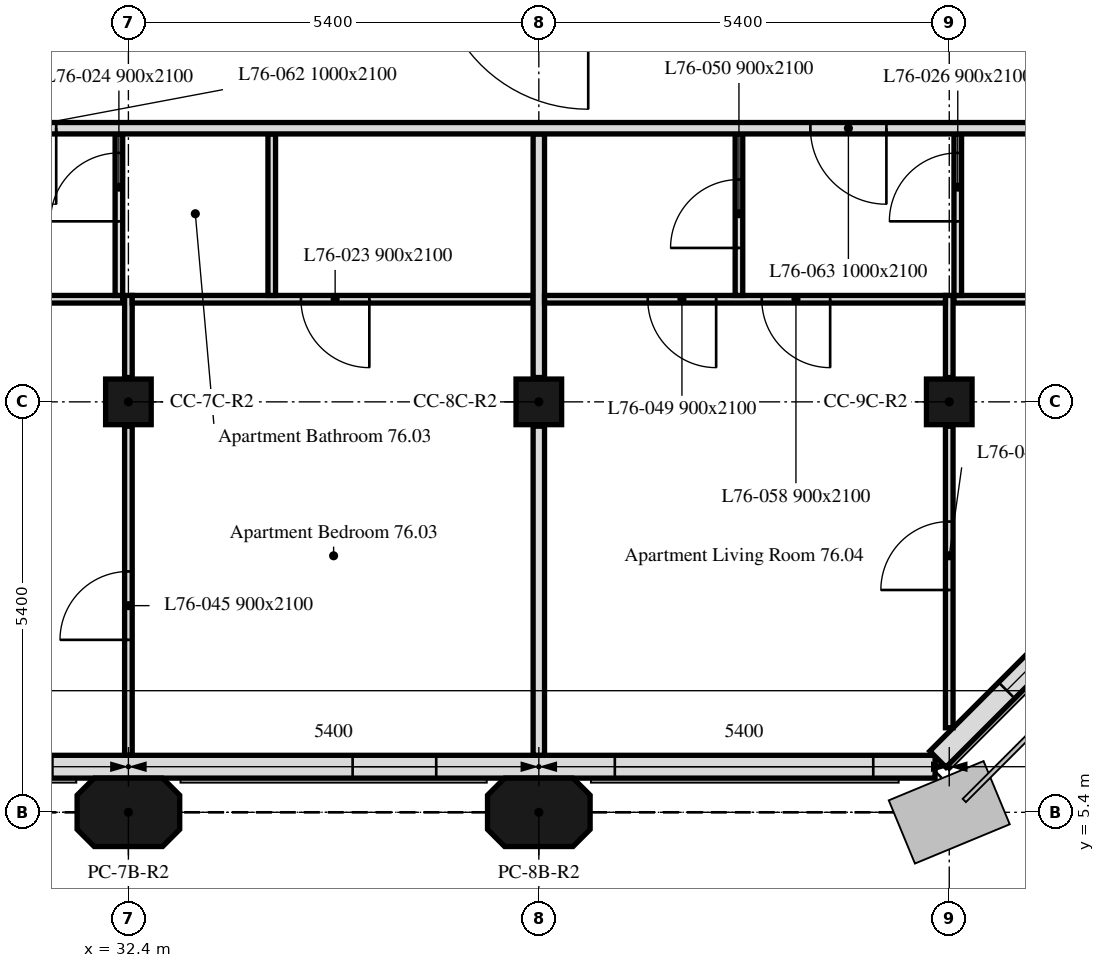
"""IFC4 building model, lengths in metres.
Left out: names, types, materials, properties, quantities, classifications, styles, units other than length and angle.
Written with IfcOpenShell. Run it as: python <this file> out.ifc"""

import sys

from ifc_helpers import new_model, si_unit, direction, frame, frame_2d, origin, origin_2d, place, context, subcontext, project, spatial, polyline, rectangle, outline, extrude, element, fill, save


model = new_model("IFC4")
c1 = context("Model", 3, precision=1e-05, world=origin(), true_north=direction((0.0, 1.0)))
c2 = subcontext(c1, "Body", "Model", "MODEL_VIEW")
j1 = project(units=[si_unit("LENGTHUNIT", "METRE"), si_unit("PLANEANGLEUNIT", "RADIAN")], contexts=[c1])
p1 = place(None, origin())
s1 = spatial("IfcSite", under=j1, at=p1, CompositionType="ELEMENT")
p2 = place(p1, origin())
s2 = spatial("IfcBuilding", under=s1, at=p2, CompositionType="ELEMENT")
p3 = place(p2, frame((0.0, 0.0, 304.9)))
s3 = spatial("IfcBuildingStorey", under=s2, at=p3, CompositionType="ELEMENT", Elevation=304.9)
for number, where, z_axis, x_axis in (
    (1, (32.4, 5.4, 0.0), (0.0, 0.0, 1.0), (1.0, 0.0, 0.0)),
    (2, (37.8, 5.4, 0.0), (0.0, 0.0, 1.0), (1.0, 0.0, 0.0)),
):
    element("IfcColumn", number, at=place(p3, frame(where, z_axis=z_axis, x_axis=x_axis)), inside=s3, PredefinedType="COLUMN", context=c2, shape_type="SweptSolid", body=[
        extrude(outline(polyline([(-0.45, -0.45), (0.45, -0.45), (0.675, -0.225), (0.675, 0.225), (0.45, 0.45), (-0.45, 0.45), (-0.675, 0.225), (-0.675, -0.225), (-0.45, -0.45)])), origin(), (0.0, 0.0, 1.0), 2.8),
    ])
for number, where, z_axis, x_axis in (
    (3, (32.4, 10.8, 0.0), (0.0, 0.0, 1.0), (1.0, 0.0, 0.0)),
    (4, (37.8, 10.8, 0.0), (0.0, 0.0, 1.0), (1.0, 0.0, 0.0)),
    (5, (43.2, 10.8, 0.0), (0.0, 0.0, 1.0), (1.0, 0.0, 0.0)),
):
    element("IfcColumn", number, at=place(p3, frame(where, z_axis=z_axis, x_axis=x_axis)), inside=s3, PredefinedType="COLUMN", context=c2, shape_type="SweptSolid", body=[
        extrude(rectangle(XDim=0.6, YDim=0.6, at=origin_2d()), origin(), (0.0, 0.0, 1.0), 2.8),
    ])
p4 = place(p3, frame((10.986, 6.0, 0.0), z_axis=(0.0, 0.0, 1.0), x_axis=(1.0, 0.0, 0.0)))
e6 = element("IfcWall", 6, at=p4, inside=s3, PredefinedType="SOLIDWALL", context=c2, shape_type="SweptSolid", body=[
    extrude(rectangle(XDim=32.027, YDim=0.3, at=frame_2d((16.014, 0.0))), origin(), (0.0, 0.0, 1.0), 2.8),
])
p5 = place(p4, frame((2.764, 0.0, 0.9)))
e7 = element("IfcOpeningElement", 7, at=p5, cuts=e6, PredefinedType="OPENING", context=c2, shape_type="SweptSolid", body=[
    extrude(rectangle(XDim=1.1, YDim=1.7, at=frame_2d((0.55, 0.85))), frame((0.0, 0.16, 0.0), z_axis=(0.0, -1.0, 0.0), x_axis=(1.0, 0.0, 0.0)), (0.0, 0.0, 1.0), 0.32),
])
p6 = place(p4, frame((6.214, 0.0, 0.9)))
e8 = element("IfcOpeningElement", 8, at=p6, cuts=e6, PredefinedType="OPENING", context=c2, shape_type="SweptSolid", body=[
    extrude(rectangle(XDim=3.4, YDim=1.7, at=frame_2d((1.7, 0.85))), frame((0.0, 0.16, 0.0), z_axis=(0.0, -1.0, 0.0), x_axis=(1.0, 0.0, 0.0)), (0.0, 0.0, 1.0), 0.32),
])
p7 = place(p4, frame((13.564, 0.0, 0.9)))
e9 = element("IfcOpeningElement", 9, at=p7, cuts=e6, PredefinedType="OPENING", context=c2, shape_type="SweptSolid", body=[
    extrude(rectangle(XDim=1.1, YDim=1.7, at=frame_2d((0.55, 0.85))), frame((0.0, 0.16, 0.0), z_axis=(0.0, -1.0, 0.0), x_axis=(1.0, 0.0, 0.0)), (0.0, 0.0, 1.0), 0.32),
])
p8 = place(p4, frame((17.014, 0.0, 0.9)))
e10 = element("IfcOpeningElement", 10, at=p8, cuts=e6, PredefinedType="OPENING", context=c2, shape_type="SweptSolid", body=[
    extrude(rectangle(XDim=3.4, YDim=1.7, at=frame_2d((1.7, 0.85))), frame((0.0, 0.16, 0.0), z_axis=(0.0, -1.0, 0.0), x_axis=(1.0, 0.0, 0.0)), (0.0, 0.0, 1.0), 0.32),
])
p9 = place(p4, frame((24.364, 0.0, 0.9)))
e11 = element("IfcOpeningElement", 11, at=p9, cuts=e6, PredefinedType="OPENING", context=c2, shape_type="SweptSolid", body=[
    extrude(rectangle(XDim=1.1, YDim=1.7, at=frame_2d((0.55, 0.85))), frame((0.0, 0.16, 0.0), z_axis=(0.0, -1.0, 0.0), x_axis=(1.0, 0.0, 0.0)), (0.0, 0.0, 1.0), 0.32),
])
p10 = place(p4, frame((27.814, 0.0, 0.9)))
e12 = element("IfcOpeningElement", 12, at=p10, cuts=e6, PredefinedType="OPENING", context=c2, shape_type="SweptSolid", body=[
    extrude(rectangle(XDim=3.4, YDim=1.7, at=frame_2d((1.7, 0.85))), frame((0.0, 0.16, 0.0), z_axis=(0.0, -1.0, 0.0), x_axis=(1.0, 0.0, 0.0)), (0.0, 0.0, 1.0), 0.32),
])
p11 = place(p3, frame((43.051, 6.099, 0.0), z_axis=(0.0, 0.0, 1.0), x_axis=(0.707106781187, 0.707106781187, 0.0)))
e13 = element("IfcWall", 13, at=p11, inside=s3, PredefinedType="SOLIDWALL", context=c2, shape_type="SweptSolid", body=[
    extrude(rectangle(XDim=6.86, YDim=0.3, at=frame_2d((3.43, 0.0))), origin(), (0.0, 0.0, 1.0), 2.8),
])
p12 = place(p11, frame((1.28, 0.0, 0.9)))
e14 = element("IfcOpeningElement", 14, at=p12, cuts=e13, PredefinedType="OPENING", context=c2, shape_type="SweptSolid", body=[
    extrude(rectangle(XDim=1.1, YDim=1.7, at=frame_2d((0.55, 0.85))), frame((0.0, 0.16, 0.0), z_axis=(0.0, -1.0, 0.0), x_axis=(1.0, 0.0, 0.0)), (0.0, 0.0, 1.0), 0.32),
])
p13 = place(p11, frame((4.48, 0.0, 0.9)))
e15 = element("IfcOpeningElement", 15, at=p13, cuts=e13, PredefinedType="OPENING", context=c2, shape_type="SweptSolid", body=[
    extrude(rectangle(XDim=1.1, YDim=1.7, at=frame_2d((0.55, 0.85))), frame((0.0, 0.16, 0.0), z_axis=(0.0, -1.0, 0.0), x_axis=(1.0, 0.0, 0.0)), (0.0, 0.0, 1.0), 0.32),
])
p14 = place(p3, frame((32.4, 6.151, 0.0), z_axis=(0.0, 0.0, 1.0), x_axis=(0.0, 1.0, 0.0)))
e16 = element("IfcWall", 16, at=p14, inside=s3, PredefinedType="PARTITIONING", context=c2, shape_type="SweptSolid", body=[
    extrude(rectangle(XDim=4.329, YDim=0.1, at=frame_2d((2.165, 0.0))), origin(), (0.0, 0.0, 1.0), 2.8),
])
p15 = place(p14, frame((1.518, 0.0, 0.0)))
e17 = element("IfcOpeningElement", 17, at=p15, cuts=e16, PredefinedType="OPENING", context=c2, shape_type="SweptSolid", body=[
    extrude(rectangle(XDim=0.9, YDim=2.1, at=frame_2d((0.45, 1.05))), frame((0.0, 0.05, 0.0), z_axis=(0.0, -1.0, 0.0), x_axis=(1.0, 0.0, 0.0)), (0.0, 0.0, 1.0), 0.1),
])
p16 = place(p3, frame((32.4, 11.12, 0.0), z_axis=(0.0, 0.0, 1.0), x_axis=(0.0, 1.0, 0.0)))
e18 = element("IfcWall", 18, at=p16, inside=s3, PredefinedType="PARTITIONING", context=c2, shape_type="SweptSolid", body=[
    extrude(rectangle(XDim=1.08, YDim=0.1, at=frame_2d((0.54, 0.0))), origin(), (0.0, 0.0, 1.0), 2.8),
])
p17 = place(p3, frame((32.325, 12.15, 0.0), z_axis=(0.0, 0.0, 1.0), x_axis=(-1.0, 0.0, 0.0)))
e19 = element("IfcWall", 19, at=p17, inside=s3, PredefinedType="PARTITIONING", context=c2, shape_type="SweptSolid", body=[
    extrude(rectangle(XDim=5.25, YDim=0.1, at=frame_2d((2.625, 0.0))), origin(), (0.0, 0.0, 1.0), 2.8),
])
p18 = place(p17, frame((3.0, 0.0, 0.0)))
e20 = element("IfcOpeningElement", 20, at=p18, cuts=e19, PredefinedType="OPENING", context=c2, shape_type="SweptSolid", body=[
    extrude(rectangle(XDim=0.9, YDim=2.1, at=frame_2d((0.45, 1.05))), frame((0.0, 0.05, 0.0), z_axis=(0.0, -1.0, 0.0), x_axis=(1.0, 0.0, 0.0)), (0.0, 0.0, 1.0), 0.1),
])
p19 = place(p17, frame((1.5, 0.0, 0.0)))
e21 = element("IfcOpeningElement", 21, at=p19, cuts=e19, PredefinedType="OPENING", context=c2, shape_type="SweptSolid", body=[
    extrude(rectangle(XDim=0.9, YDim=2.1, at=frame_2d((0.45, 1.05))), frame((0.0, 0.05, 0.0), z_axis=(0.0, -1.0, 0.0), x_axis=(1.0, 0.0, 0.0)), (0.0, 0.0, 1.0), 0.1),
])
p20 = place(p3, frame((37.8, 6.151, 0.0), z_axis=(0.0, 0.0, 1.0), x_axis=(0.0, 1.0, 0.0)))
e22 = element("IfcWall", 22, at=p20, inside=s3, PredefinedType="PARTITIONING", context=c2, shape_type="SweptSolid", body=[
    extrude(rectangle(XDim=4.329, YDim=0.15, at=frame_2d((2.165, 0.0))), origin(), (0.0, 0.0, 1.0), 2.8),
])
p21 = place(p3, frame((37.725, 12.15, 0.0), z_axis=(0.0, 0.0, 1.0), x_axis=(-1.0, 0.0, 0.0)))
e23 = element("IfcWall", 23, at=p21, inside=s3, PredefinedType="PARTITIONING", context=c2, shape_type="SweptSolid", body=[
    extrude(rectangle(XDim=5.275, YDim=0.1, at=frame_2d((2.638, 0.0))), origin(), (0.0, 0.0, 1.0), 2.8),
])
p22 = place(p21, frame((2.155, 0.0, 0.0)))
e24 = element("IfcOpeningElement", 24, at=p22, cuts=e23, PredefinedType="OPENING", context=c2, shape_type="SweptSolid", body=[
    extrude(rectangle(XDim=0.9, YDim=2.1, at=frame_2d((0.45, 1.05))), frame((0.0, 0.05, 0.0), z_axis=(0.0, -1.0, 0.0), x_axis=(1.0, 0.0, 0.0)), (0.0, 0.0, 1.0), 0.1),
])
p23 = place(p3, frame((32.275, 12.2, 0.0), z_axis=(0.0, 0.0, 1.0), x_axis=(0.0, 1.0, 0.0)))
e25 = element("IfcWall", 25, at=p23, inside=s3, PredefinedType="PARTITIONING", context=c2, shape_type="SweptSolid", body=[
    extrude(rectangle(XDim=2.125, YDim=0.1, at=frame_2d((1.062, 0.0))), origin(), (0.0, 0.0, 1.0), 2.8),
])
p24 = place(p23, frame((0.975, 0.0, 0.0)))
e26 = element("IfcOpeningElement", 26, at=p24, cuts=e25, PredefinedType="OPENING", context=c2, shape_type="SweptSolid", body=[
    extrude(rectangle(XDim=0.9, YDim=2.1, at=frame_2d((0.45, 1.05))), frame((0.0, 0.05, 0.0), z_axis=(0.0, -1.0, 0.0), x_axis=(1.0, 0.0, 0.0)), (0.0, 0.0, 1.0), 0.1),
])
p25 = place(p3, frame((34.286, 12.2, 0.0), z_axis=(0.0, 0.0, 1.0), x_axis=(0.0, 1.0, 0.0)))
e27 = element("IfcWall", 27, at=p25, inside=s3, PredefinedType="PARTITIONING", context=c2, shape_type="SweptSolid", body=[
    extrude(rectangle(XDim=2.125, YDim=0.1, at=frame_2d((1.062, 0.0))), origin(), (0.0, 0.0, 1.0), 2.8),
])
p26 = place(p3, frame((37.8, 11.12, 0.0), z_axis=(0.0, 0.0, 1.0), x_axis=(0.0, 1.0, 0.0)))
e28 = element("IfcWall", 28, at=p26, inside=s3, PredefinedType="PARTITIONING", context=c2, shape_type="SweptSolid", body=[
    extrude(rectangle(XDim=3.205, YDim=0.15, at=frame_2d((1.603, 0.0))), origin(), (0.0, 0.0, 1.0), 2.8),
])
p27 = place(p3, frame((43.2, 6.512, 0.0), z_axis=(0.0, 0.0, 1.0), x_axis=(0.0, 1.0, 0.0)))
e29 = element("IfcWall", 29, at=p27, inside=s3, PredefinedType="PARTITIONING", context=c2, shape_type="SweptSolid", body=[
    extrude(rectangle(XDim=3.968, YDim=0.1, at=frame_2d((1.984, 0.0))), origin(), (0.0, 0.0, 1.0), 2.8),
])
p28 = place(p27, frame((1.813, 0.0, 0.0)))
e30 = element("IfcOpeningElement", 30, at=p28, cuts=e29, PredefinedType="OPENING", context=c2, shape_type="SweptSolid", body=[
    extrude(rectangle(XDim=0.9, YDim=2.1, at=frame_2d((0.45, 1.05))), frame((0.0, 0.05, 0.0), z_axis=(0.0, -1.0, 0.0), x_axis=(1.0, 0.0, 0.0)), (0.0, 0.0, 1.0), 0.1),
])
p29 = place(p3, frame((43.2, 11.12, 0.0), z_axis=(0.0, 0.0, 1.0), x_axis=(0.0, 1.0, 0.0)))
e31 = element("IfcWall", 31, at=p29, inside=s3, PredefinedType="PARTITIONING", context=c2, shape_type="SweptSolid", body=[
    extrude(rectangle(XDim=1.08, YDim=0.1, at=frame_2d((0.54, 0.0))), origin(), (0.0, 0.0, 1.0), 2.8),
])
p30 = place(p3, frame((43.15, 12.15, 0.0), z_axis=(0.0, 0.0, 1.0), x_axis=(-1.0, 0.0, 0.0)))
e32 = element("IfcWall", 32, at=p30, inside=s3, PredefinedType="PARTITIONING", context=c2, shape_type="SweptSolid", body=[
    extrude(rectangle(XDim=5.275, YDim=0.1, at=frame_2d((2.637, 0.0))), origin(), (0.0, 0.0, 1.0), 2.8),
])
p31 = place(p30, frame((3.017, 0.0, 0.0)))
e33 = element("IfcOpeningElement", 33, at=p31, cuts=e32, PredefinedType="OPENING", context=c2, shape_type="SweptSolid", body=[
    extrude(rectangle(XDim=0.9, YDim=2.1, at=frame_2d((0.45, 1.05))), frame((0.0, 0.05, 0.0), z_axis=(0.0, -1.0, 0.0), x_axis=(1.0, 0.0, 0.0)), (0.0, 0.0, 1.0), 0.1),
])
p32 = place(p30, frame((1.517, 0.0, 0.0)))
e34 = element("IfcOpeningElement", 34, at=p32, cuts=e32, PredefinedType="OPENING", context=c2, shape_type="SweptSolid", body=[
    extrude(rectangle(XDim=0.9, YDim=2.1, at=frame_2d((0.45, 1.05))), frame((0.0, 0.05, 0.0), z_axis=(0.0, -1.0, 0.0), x_axis=(1.0, 0.0, 0.0)), (0.0, 0.0, 1.0), 0.1),
])
p33 = place(p3, frame((47.849, 12.15, 0.0), z_axis=(0.0, 0.0, 1.0), x_axis=(-1.0, 0.0, 0.0)))
e35 = element("IfcWall", 35, at=p33, inside=s3, PredefinedType="PARTITIONING", context=c2, shape_type="SweptSolid", body=[
    extrude(rectangle(XDim=4.587, YDim=0.1, at=frame_2d((2.293, 0.0))), origin(), (0.0, 0.0, 1.0), 2.8),
])
p34 = place(p33, frame((0.418, 0.0, 0.0)))
e36 = element("IfcOpeningElement", 36, at=p34, cuts=e35, PredefinedType="OPENING", context=c2, shape_type="SweptSolid", body=[
    extrude(rectangle(XDim=0.9, YDim=2.1, at=frame_2d((0.45, 1.05))), frame((0.0, 0.05, 0.0), z_axis=(0.0, -1.0, 0.0), x_axis=(1.0, 0.0, 0.0)), (0.0, 0.0, 1.0), 0.1),
])
p35 = place(p3, frame((40.433, 12.2, 0.0), z_axis=(0.0, 0.0, 1.0), x_axis=(0.0, 1.0, 0.0)))
e37 = element("IfcWall", 37, at=p35, inside=s3, PredefinedType="PARTITIONING", context=c2, shape_type="SweptSolid", body=[
    extrude(rectangle(XDim=2.125, YDim=0.1, at=frame_2d((1.062, 0.0))), origin(), (0.0, 0.0, 1.0), 2.8),
])
p36 = place(p35, frame((0.625, 0.0, 0.0)))
e38 = element("IfcOpeningElement", 38, at=p36, cuts=e37, PredefinedType="OPENING", context=c2, shape_type="SweptSolid", body=[
    extrude(rectangle(XDim=0.9, YDim=2.1, at=frame_2d((0.45, 1.05))), frame((0.0, 0.05, 0.0), z_axis=(0.0, -1.0, 0.0), x_axis=(1.0, 0.0, 0.0)), (0.0, 0.0, 1.0), 0.1),
])
p37 = place(p3, frame((43.312, 12.2, 0.0), z_axis=(0.0, 0.0, 1.0), x_axis=(0.0, 1.0, 0.0)))
e39 = element("IfcWall", 39, at=p37, inside=s3, PredefinedType="PARTITIONING", context=c2, shape_type="SweptSolid", body=[
    extrude(rectangle(XDim=2.125, YDim=0.1, at=frame_2d((1.062, 0.0))), origin(), (0.0, 0.0, 1.0), 2.8),
])
p38 = place(p37, frame((0.975, 0.0, 0.0)))
e40 = element("IfcOpeningElement", 40, at=p38, cuts=e39, PredefinedType="OPENING", context=c2, shape_type="SweptSolid", body=[
    extrude(rectangle(XDim=0.9, YDim=2.1, at=frame_2d((0.45, 1.05))), frame((0.0, 0.05, 0.0), z_axis=(0.0, -1.0, 0.0), x_axis=(1.0, 0.0, 0.0)), (0.0, 0.0, 1.0), 0.1),
])
p39 = place(p3, frame((47.849, 14.4, 0.0), z_axis=(0.0, 0.0, 1.0), x_axis=(-1.0, 0.0, 0.0)))
e41 = element("IfcWall", 41, at=p39, inside=s3, PredefinedType="PARTITIONING", context=c2, shape_type="SweptSolid", body=[
    extrude(rectangle(XDim=41.698, YDim=0.15, at=frame_2d((20.849, 0.0))), origin(), (0.0, 0.0, 1.0), 2.8),
])
p40 = place(p39, frame((38.179, 0.0, 0.0)))
e42 = element("IfcOpeningElement", 42, at=p40, cuts=e41, PredefinedType="OPENING", context=c2, shape_type="SweptSolid", body=[
    extrude(rectangle(XDim=1.0, YDim=2.1, at=frame_2d((0.5, 1.05))), frame((0.0, 0.075, 0.0), z_axis=(0.0, -1.0, 0.0), x_axis=(1.0, 0.0, 0.0)), (0.0, 0.0, 1.0), 0.15),
])
p41 = place(p39, frame((27.977, 0.0, 0.0)))
e43 = element("IfcOpeningElement", 43, at=p41, cuts=e41, PredefinedType="OPENING", context=c2, shape_type="SweptSolid", body=[
    extrude(rectangle(XDim=1.0, YDim=2.1, at=frame_2d((0.5, 1.05))), frame((0.0, 0.075, 0.0), z_axis=(0.0, -1.0, 0.0), x_axis=(1.0, 0.0, 0.0)), (0.0, 0.0, 1.0), 0.15),
])
p42 = place(p39, frame((16.399, 0.0, 0.0)))
e44 = element("IfcOpeningElement", 44, at=p42, cuts=e41, PredefinedType="OPENING", context=c2, shape_type="SweptSolid", body=[
    extrude(rectangle(XDim=1.0, YDim=2.1, at=frame_2d((0.5, 1.05))), frame((0.0, 0.075, 0.0), z_axis=(0.0, -1.0, 0.0), x_axis=(1.0, 0.0, 0.0)), (0.0, 0.0, 1.0), 0.15),
])
p43 = place(p39, frame((5.476, 0.0, 0.0)))
e45 = element("IfcOpeningElement", 45, at=p43, cuts=e41, PredefinedType="OPENING", context=c2, shape_type="SweptSolid", body=[
    extrude(rectangle(XDim=1.0, YDim=2.1, at=frame_2d((0.5, 1.05))), frame((0.0, 0.075, 0.0), z_axis=(0.0, -1.0, 0.0), x_axis=(1.0, 0.0, 0.0)), (0.0, 0.0, 1.0), 0.15),
])
p44 = place(p9, origin())
e46 = element("IfcWindow", 46, at=p44, inside=s3, PartitioningType="SINGLE_PANEL", PredefinedType="WINDOW", context=c2, shape_type="SweptSolid", body=[
    extrude(rectangle(XDim=1.1, YDim=1.7, at=frame_2d((0.55, 0.85))), frame((0.0, 0.03, 0.0), z_axis=(0.0, -1.0, 0.0), x_axis=(1.0, 0.0, 0.0)), (0.0, 0.0, 1.0), 0.06),
])
fill(e11, e46)
p45 = place(p10, origin())
e47 = element("IfcWindow", 47, at=p45, inside=s3, PartitioningType="SINGLE_PANEL", PredefinedType="WINDOW", context=c2, shape_type="SweptSolid", body=[
    extrude(rectangle(XDim=3.4, YDim=1.7, at=frame_2d((1.7, 0.85))), frame((0.0, 0.03, 0.0), z_axis=(0.0, -1.0, 0.0), x_axis=(1.0, 0.0, 0.0)), (0.0, 0.0, 1.0), 0.06),
])
fill(e12, e47)
p46 = place(p12, origin())
e48 = element("IfcWindow", 48, at=p46, inside=s3, PartitioningType="SINGLE_PANEL", PredefinedType="WINDOW", context=c2, shape_type="SweptSolid", body=[
    extrude(rectangle(XDim=1.1, YDim=1.7, at=frame_2d((0.55, 0.85))), frame((0.0, 0.03, 0.0), z_axis=(0.0, -1.0, 0.0), x_axis=(1.0, 0.0, 0.0)), (0.0, 0.0, 1.0), 0.06),
])
fill(e14, e48)
p47 = place(p22, origin())
e49 = element("IfcDoor", 49, at=p47, inside=s3, OperationType="SINGLE_SWING_LEFT", PredefinedType="DOOR", context=c2, shape_type="SweptSolid", body=[
    extrude(rectangle(XDim=0.9, YDim=2.1, at=frame_2d((0.45, 1.05))), frame((0.0, 0.025, 0.0), z_axis=(0.0, -1.0, 0.0), x_axis=(1.0, 0.0, 0.0)), (0.0, 0.0, 1.0), 0.05),
])
fill(e24, e49)
p48 = place(p24, origin())
e50 = element("IfcDoor", 50, at=p48, inside=s3, OperationType="SINGLE_SWING_RIGHT", PredefinedType="DOOR", context=c2, shape_type="SweptSolid", body=[
    extrude(rectangle(XDim=0.9, YDim=2.1, at=frame_2d((0.45, 1.05))), frame((0.0, 0.025, 0.0), z_axis=(0.0, -1.0, 0.0), x_axis=(1.0, 0.0, 0.0)), (0.0, 0.0, 1.0), 0.05),
])
fill(e26, e50)
p49 = place(p38, origin())
e51 = element("IfcDoor", 51, at=p49, inside=s3, OperationType="SINGLE_SWING_LEFT", PredefinedType="DOOR", context=c2, shape_type="SweptSolid", body=[
    extrude(rectangle(XDim=0.9, YDim=2.1, at=frame_2d((0.45, 1.05))), frame((0.0, 0.025, 0.0), z_axis=(0.0, -1.0, 0.0), x_axis=(1.0, 0.0, 0.0)), (0.0, 0.0, 1.0), 0.05),
])
fill(e40, e51)
p50 = place(p15, origin())
e52 = element("IfcDoor", 52, at=p50, inside=s3, OperationType="SINGLE_SWING_LEFT", PredefinedType="DOOR", context=c2, shape_type="SweptSolid", body=[
    extrude(rectangle(XDim=0.9, YDim=2.1, at=frame_2d((0.45, 1.05))), frame((0.0, 0.025, 0.0), z_axis=(0.0, -1.0, 0.0), x_axis=(1.0, 0.0, 0.0)), (0.0, 0.0, 1.0), 0.05),
])
fill(e17, e52)
p51 = place(p28, origin())
e53 = element("IfcDoor", 53, at=p51, inside=s3, OperationType="SINGLE_SWING_LEFT", PredefinedType="DOOR", context=c2, shape_type="SweptSolid", body=[
    extrude(rectangle(XDim=0.9, YDim=2.1, at=frame_2d((0.45, 1.05))), frame((0.0, 0.025, 0.0), z_axis=(0.0, -1.0, 0.0), x_axis=(1.0, 0.0, 0.0)), (0.0, 0.0, 1.0), 0.05),
])
fill(e30, e53)
p52 = place(p31, origin())
e54 = element("IfcDoor", 54, at=p52, inside=s3, OperationType="SINGLE_SWING_LEFT", PredefinedType="DOOR", context=c2, shape_type="SweptSolid", body=[
    extrude(rectangle(XDim=0.9, YDim=2.1, at=frame_2d((0.45, 1.05))), frame((0.0, 0.025, 0.0), z_axis=(0.0, -1.0, 0.0), x_axis=(1.0, 0.0, 0.0)), (0.0, 0.0, 1.0), 0.05),
])
fill(e33, e54)
p53 = place(p36, origin())
e55 = element("IfcDoor", 55, at=p53, inside=s3, OperationType="SINGLE_SWING_LEFT", PredefinedType="DOOR", context=c2, shape_type="SweptSolid", body=[
    extrude(rectangle(XDim=0.9, YDim=2.1, at=frame_2d((0.45, 1.05))), frame((0.0, 0.025, 0.0), z_axis=(0.0, -1.0, 0.0), x_axis=(1.0, 0.0, 0.0)), (0.0, 0.0, 1.0), 0.05),
])
fill(e38, e55)
p54 = place(p32, origin())
e56 = element("IfcDoor", 56, at=p54, inside=s3, OperationType="SINGLE_SWING_RIGHT", PredefinedType="DOOR", context=c2, shape_type="SweptSolid", body=[
    extrude(rectangle(XDim=0.9, YDim=2.1, at=frame_2d((0.45, 1.05))), frame((0.0, 0.025, 0.0), z_axis=(0.0, -1.0, 0.0), x_axis=(1.0, 0.0, 0.0)), (0.0, 0.0, 1.0), 0.05),
])
fill(e34, e56)
p55 = place(p42, origin())
e57 = element("IfcDoor", 57, at=p55, inside=s3, OperationType="SINGLE_SWING_LEFT", PredefinedType="DOOR", context=c2, shape_type="SweptSolid", body=[
    extrude(rectangle(XDim=1.0, YDim=2.1, at=frame_2d((0.5, 1.05))), frame((0.0, 0.025, 0.0), z_axis=(0.0, -1.0, 0.0), x_axis=(1.0, 0.0, 0.0)), (0.0, 0.0, 1.0), 0.05),
])
fill(e44, e57)
p56 = place(p43, origin())
e58 = element("IfcDoor", 58, at=p56, inside=s3, OperationType="SINGLE_SWING_LEFT", PredefinedType="DOOR", context=c2, shape_type="SweptSolid", body=[
    extrude(rectangle(XDim=1.0, YDim=2.1, at=frame_2d((0.5, 1.05))), frame((0.0, 0.025, 0.0), z_axis=(0.0, -1.0, 0.0), x_axis=(1.0, 0.0, 0.0)), (0.0, 0.0, 1.0), 0.05),
])
fill(e45, e58)
save(model, sys.argv[1])
